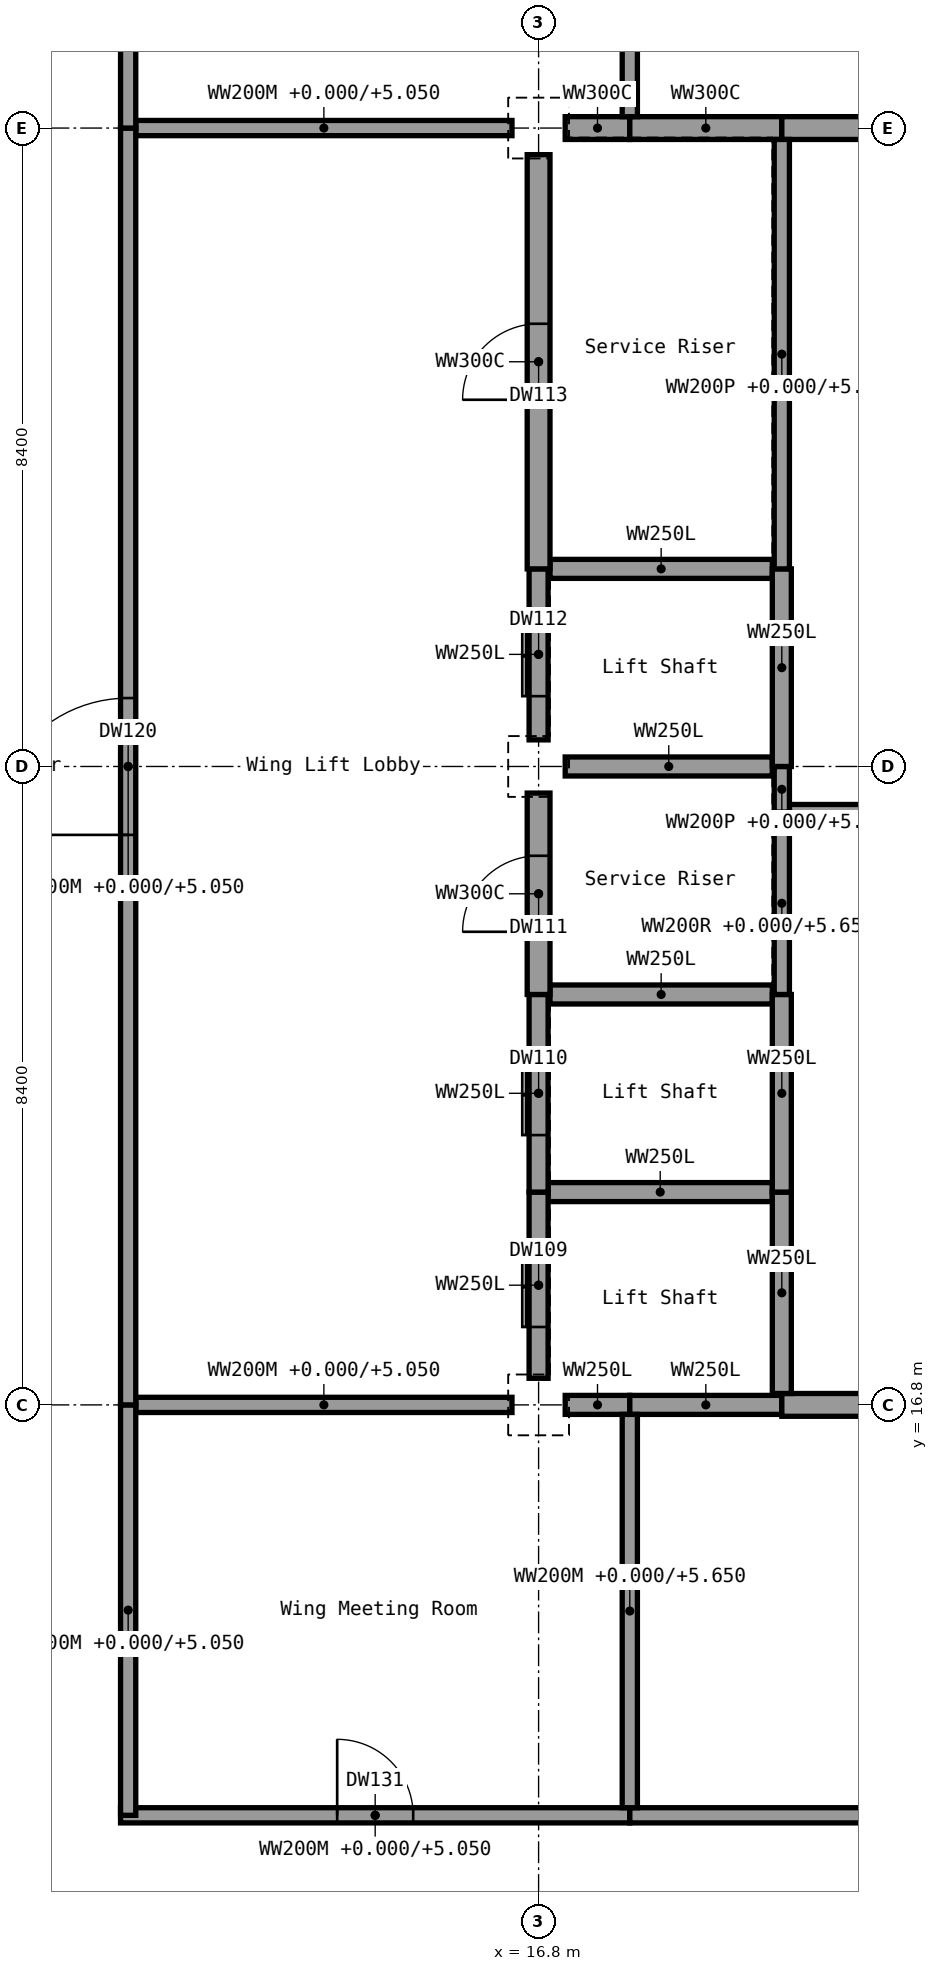
"""IFC4 building model, lengths in metres.
Left out: names, types, materials, properties, quantities, classifications, styles, units other than length and angle.
Written with IfcOpenShell. Run it as: python <this file> out.ifc"""

import sys

from ifc_helpers import new_model, si_unit, direction, frame, frame_2d, origin, origin_2d, place, context, subcontext, project, spatial, rectangle, extrude, element, fill, save


model = new_model("IFC4")
c1 = context("Model", 3, precision=1e-05, world=origin(), true_north=direction((0.0, 1.0)))
c2 = subcontext(c1, "Body", "Model", "MODEL_VIEW")
j1 = project(units=[si_unit("LENGTHUNIT", "METRE"), si_unit("PLANEANGLEUNIT", "RADIAN")], contexts=[c1])
p1 = place(None, origin())
s1 = spatial("IfcSite", under=j1, at=p1, CompositionType="ELEMENT")
p2 = place(p1, origin())
s2 = spatial("IfcBuilding", under=s1, at=p2, CompositionType="ELEMENT")
p3 = place(p2, origin())
s3 = spatial("IfcBuildingStorey", under=s2, at=p3, CompositionType="ELEMENT", Elevation=0.0)
for number, where, z_axis, x_axis in (
    (1, (16.8, 16.8, 0.0), (0.0, 0.0, 1.0), (1.0, 0.0, 0.0)),
    (2, (16.8, 25.2, 0.0), (0.0, 0.0, 1.0), (1.0, 0.0, 0.0)),
    (3, (16.8, 33.6, 0.0), (0.0, 0.0, 1.0), (1.0, 0.0, 0.0)),
):
    element("IfcColumn", number, at=place(p3, frame(where, z_axis=z_axis, x_axis=x_axis)), inside=s3, PredefinedType="COLUMN", context=c2, shape_type="SweptSolid", body=[
        extrude(rectangle(XDim=0.7, YDim=0.7, at=origin_2d()), origin(), (0.0, 0.0, 1.0), 6.0),
    ])
p4 = place(p3, frame((11.3, 11.4, 0.0), z_axis=(0.0, 0.0, 1.0), x_axis=(1.0, 0.0, 0.0)))
e4 = element("IfcWall", 4, at=p4, inside=s3, PredefinedType="PARTITIONING", context=c2, shape_type="SweptSolid", body=[
    extrude(rectangle(XDim=6.7, YDim=0.2, at=frame_2d((3.35, 0.0))), origin(), (0.0, 0.0, 1.0), 5.05),
])
p5 = place(p4, frame((2.85, 0.0, 0.0)))
e5 = element("IfcOpeningElement", 5, at=p5, cuts=e4, PredefinedType="OPENING", context=c2, shape_type="SweptSolid", body=[
    extrude(rectangle(XDim=1.0, YDim=2.1, at=frame_2d((0.5, 1.05))), frame((0.0, 0.1, 0.0), z_axis=(0.0, -1.0, 0.0), x_axis=(1.0, 0.0, 0.0)), (0.0, 0.0, 1.0), 0.2),
])
p6 = place(p3, frame((18.0, 11.4, 0.0), z_axis=(0.0, 0.0, 1.0), x_axis=(1.0, 0.0, 0.0)))
e6 = element("IfcWall", 6, at=p6, inside=s3, PredefinedType="PARTITIONING", context=c2, shape_type="SweptSolid", body=[
    extrude(rectangle(XDim=12.0, YDim=0.2, at=frame_2d((6.0, 0.0))), origin(), (0.0, 0.0, 1.0), 5.05),
])
p7 = place(p6, frame((5.5, 0.0, 0.0)))
e7 = element("IfcOpeningElement", 7, at=p7, cuts=e6, PredefinedType="OPENING", context=c2, shape_type="SweptSolid", body=[
    extrude(rectangle(XDim=1.0, YDim=2.1, at=frame_2d((0.5, 1.05))), frame((0.0, 0.1, 0.0), z_axis=(0.0, -1.0, 0.0), x_axis=(1.0, 0.0, 0.0)), (0.0, 0.0, 1.0), 0.2),
])
p8 = place(p3, frame((11.5, 16.8, 0.0), z_axis=(0.0, 0.0, 1.0), x_axis=(1.0, 0.0, 0.0)))
e8 = element("IfcWall", 8, at=p8, inside=s3, PredefinedType="PARTITIONING", context=c2, shape_type="SweptSolid", body=[
    extrude(rectangle(XDim=4.95, YDim=0.2, at=frame_2d((2.475, 0.0))), origin(), (0.0, 0.0, 1.0), 5.05),
])
p9 = place(p3, frame((17.15, 16.8, 0.0), z_axis=(0.0, 0.0, 1.0), x_axis=(1.0, 0.0, 0.0)))
e9 = element("IfcWall", 9, at=p9, inside=s3, PredefinedType="SHEAR", context=c2, shape_type="SweptSolid", body=[
    extrude(rectangle(XDim=0.85, YDim=0.25, at=frame_2d((0.425, 0.0))), origin(), (0.0, 0.0, 1.0), 5.65),
])
p10 = place(p3, frame((18.0, 16.8, 0.0), z_axis=(0.0, 0.0, 1.0), x_axis=(1.0, 0.0, 0.0)))
e10 = element("IfcWall", 10, at=p10, inside=s3, PredefinedType="SHEAR", context=c2, shape_type="SweptSolid", body=[
    extrude(rectangle(XDim=2.0, YDim=0.25, at=frame_2d((1.0, 0.0))), origin(), (0.0, 0.0, 1.0), 5.65),
])
p11 = place(p3, frame((20.0, 16.8, 0.0), z_axis=(0.0, 0.0, 1.0), x_axis=(1.0, 0.0, 0.0)))
e11 = element("IfcWall", 11, at=p11, inside=s3, PredefinedType="SHEAR", context=c2, shape_type="SweptSolid", body=[
    extrude(rectangle(XDim=4.85, YDim=0.3, at=frame_2d((2.425, 0.0))), origin(), (0.0, 0.0, 1.0), 5.65),
])
p12 = place(p11, frame((1.925, 0.0, 0.0)))
e12 = element("IfcOpeningElement", 12, at=p12, cuts=e11, PredefinedType="OPENING", context=c2, shape_type="SweptSolid", body=[
    extrude(rectangle(XDim=1.0, YDim=2.1, at=frame_2d((0.5, 1.05))), frame((0.0, 0.15, 0.0), z_axis=(0.0, -1.0, 0.0), x_axis=(1.0, 0.0, 0.0)), (0.0, 0.0, 1.0), 0.3),
])
p13 = place(p3, frame((16.925, 19.6, 0.0), z_axis=(0.0, 0.0, 1.0), x_axis=(1.0, 0.0, 0.0)))
e13 = element("IfcWall", 13, at=p13, inside=s3, PredefinedType="SHEAR", context=c2, shape_type="SweptSolid", body=[
    extrude(rectangle(XDim=2.95, YDim=0.25, at=frame_2d((1.475, 0.0))), origin(), (0.0, 0.0, 1.0), 5.65),
])
p14 = place(p3, frame((16.95, 22.2, 0.0), z_axis=(0.0, 0.0, 1.0), x_axis=(1.0, 0.0, 0.0)))
e14 = element("IfcWall", 14, at=p14, inside=s3, PredefinedType="SHEAR", context=c2, shape_type="SweptSolid", body=[
    extrude(rectangle(XDim=2.925, YDim=0.25, at=frame_2d((1.462, 0.0))), origin(), (0.0, 0.0, 1.0), 5.65),
])
p15 = place(p3, frame((20.1, 24.6, 0.0), z_axis=(0.0, 0.0, 1.0), x_axis=(1.0, 0.0, 0.0)))
e15 = element("IfcWall", 15, at=p15, inside=s3, PredefinedType="SOLIDWALL", context=c2, shape_type="SweptSolid", body=[
    extrude(rectangle(XDim=6.7, YDim=0.2, at=frame_2d((3.35, 0.0))), origin(), (0.0, 0.0, 1.0), 5.65),
])
p16 = place(p3, frame((17.15, 25.2, 0.0), z_axis=(0.0, 0.0, 1.0), x_axis=(1.0, 0.0, 0.0)))
e16 = element("IfcWall", 16, at=p16, inside=s3, PredefinedType="SHEAR", context=c2, shape_type="SweptSolid", body=[
    extrude(rectangle(XDim=2.725, YDim=0.25, at=frame_2d((1.363, 0.0))), origin(), (0.0, 0.0, 1.0), 5.65),
])
p17 = place(p3, frame((16.95, 27.8, 0.0), z_axis=(0.0, 0.0, 1.0), x_axis=(1.0, 0.0, 0.0)))
e17 = element("IfcWall", 17, at=p17, inside=s3, PredefinedType="SHEAR", context=c2, shape_type="SweptSolid", body=[
    extrude(rectangle(XDim=2.925, YDim=0.25, at=frame_2d((1.462, 0.0))), origin(), (0.0, 0.0, 1.0), 5.65),
])
p18 = place(p3, frame((11.5, 33.6, 0.0), z_axis=(0.0, 0.0, 1.0), x_axis=(1.0, 0.0, 0.0)))
e18 = element("IfcWall", 18, at=p18, inside=s3, PredefinedType="PARTITIONING", context=c2, shape_type="SweptSolid", body=[
    extrude(rectangle(XDim=4.95, YDim=0.2, at=frame_2d((2.475, 0.0))), origin(), (0.0, 0.0, 1.0), 5.05),
])
p19 = place(p3, frame((17.15, 33.6, 0.0), z_axis=(0.0, 0.0, 1.0), x_axis=(1.0, 0.0, 0.0)))
e19 = element("IfcWall", 19, at=p19, inside=s3, PredefinedType="SHEAR", context=c2, shape_type="SweptSolid", body=[
    extrude(rectangle(XDim=0.85, YDim=0.3, at=frame_2d((0.425, 0.0))), origin(), (0.0, 0.0, 1.0), 5.65),
])
p20 = place(p3, frame((18.0, 33.6, 0.0), z_axis=(0.0, 0.0, 1.0), x_axis=(1.0, 0.0, 0.0)))
e20 = element("IfcWall", 20, at=p20, inside=s3, PredefinedType="SHEAR", context=c2, shape_type="SweptSolid", body=[
    extrude(rectangle(XDim=2.0, YDim=0.3, at=frame_2d((1.0, 0.0))), origin(), (0.0, 0.0, 1.0), 5.65),
])
p21 = place(p3, frame((20.0, 33.6, 0.0), z_axis=(0.0, 0.0, 1.0), x_axis=(1.0, 0.0, 0.0)))
e21 = element("IfcWall", 21, at=p21, inside=s3, PredefinedType="SHEAR", context=c2, shape_type="SweptSolid", body=[
    extrude(rectangle(XDim=4.85, YDim=0.3, at=frame_2d((2.425, 0.0))), origin(), (0.0, 0.0, 1.0), 5.65),
])
p22 = place(p21, frame((1.925, 0.0, 0.0)))
e22 = element("IfcOpeningElement", 22, at=p22, cuts=e21, PredefinedType="OPENING", context=c2, shape_type="SweptSolid", body=[
    extrude(rectangle(XDim=1.0, YDim=2.1, at=frame_2d((0.5, 1.05))), frame((0.0, 0.15, 0.0), z_axis=(0.0, -1.0, 0.0), x_axis=(1.0, 0.0, 0.0)), (0.0, 0.0, 1.0), 0.3),
])
p23 = place(p3, frame((11.4, 11.4, 0.0), z_axis=(0.0, 0.0, 1.0), x_axis=(0.0, 1.0, 0.0)))
e23 = element("IfcWall", 23, at=p23, inside=s3, PredefinedType="PARTITIONING", context=c2, shape_type="SweptSolid", body=[
    extrude(rectangle(XDim=5.4, YDim=0.2, at=frame_2d((2.7, 0.0))), origin(), (0.0, 0.0, 1.0), 5.05),
])
p24 = place(p3, frame((11.4, 16.8, 0.0), z_axis=(0.0, 0.0, 1.0), x_axis=(0.0, 1.0, 0.0)))
e24 = element("IfcWall", 24, at=p24, inside=s3, PredefinedType="PARTITIONING", context=c2, shape_type="SweptSolid", body=[
    extrude(rectangle(XDim=16.8, YDim=0.2, at=frame_2d((8.4, 0.0))), origin(), (0.0, 0.0, 1.0), 5.05),
])
p25 = place(p24, frame((7.5, 0.0, 0.0)))
e25 = element("IfcOpeningElement", 25, at=p25, cuts=e24, PredefinedType="OPENING", context=c2, shape_type="SweptSolid", body=[
    extrude(rectangle(XDim=1.8, YDim=2.1, at=frame_2d((0.9, 1.05))), frame((0.0, 0.1, 0.0), z_axis=(0.0, -1.0, 0.0), x_axis=(1.0, 0.0, 0.0)), (0.0, 0.0, 1.0), 0.2),
])
p26 = place(p3, frame((11.4, 33.6, 0.0), z_axis=(0.0, 0.0, 1.0), x_axis=(0.0, 1.0, 0.0)))
e26 = element("IfcWall", 26, at=p26, inside=s3, PredefinedType="PARTITIONING", context=c2, shape_type="SweptSolid", body=[
    extrude(rectangle(XDim=5.4, YDim=0.2, at=frame_2d((2.7, 0.0))), origin(), (0.0, 0.0, 1.0), 5.05),
])
p27 = place(p3, frame((16.8, 17.15, 0.0), z_axis=(0.0, 0.0, 1.0), x_axis=(0.0, 1.0, 0.0)))
e27 = element("IfcWall", 27, at=p27, inside=s3, PredefinedType="SHEAR", context=c2, shape_type="SweptSolid", body=[
    extrude(rectangle(XDim=2.45, YDim=0.25, at=frame_2d((1.225, 0.0))), origin(), (0.0, 0.0, 1.0), 5.65),
])
p28 = place(p27, frame((0.675, 0.0, 0.0)))
e28 = element("IfcOpeningElement", 28, at=p28, cuts=e27, PredefinedType="OPENING", context=c2, shape_type="SweptSolid", body=[
    extrude(rectangle(XDim=1.1, YDim=2.1, at=frame_2d((0.55, 1.05))), frame((0.0, 0.125, 0.0), z_axis=(0.0, -1.0, 0.0), x_axis=(1.0, 0.0, 0.0)), (0.0, 0.0, 1.0), 0.25),
])
p29 = place(p3, frame((16.8, 19.6, 0.0), z_axis=(0.0, 0.0, 1.0), x_axis=(0.0, 1.0, 0.0)))
e29 = element("IfcWall", 29, at=p29, inside=s3, PredefinedType="SHEAR", context=c2, shape_type="SweptSolid", body=[
    extrude(rectangle(XDim=2.6, YDim=0.25, at=frame_2d((1.3, 0.0))), origin(), (0.0, 0.0, 1.0), 5.65),
])
p30 = place(p29, frame((0.75, 0.0, 0.0)))
e30 = element("IfcOpeningElement", 30, at=p30, cuts=e29, PredefinedType="OPENING", context=c2, shape_type="SweptSolid", body=[
    extrude(rectangle(XDim=1.1, YDim=2.1, at=frame_2d((0.55, 1.05))), frame((0.0, 0.125, 0.0), z_axis=(0.0, -1.0, 0.0), x_axis=(1.0, 0.0, 0.0)), (0.0, 0.0, 1.0), 0.25),
])
p31 = place(p3, frame((16.8, 22.2, 0.0), z_axis=(0.0, 0.0, 1.0), x_axis=(0.0, 1.0, 0.0)))
e31 = element("IfcWall", 31, at=p31, inside=s3, PredefinedType="SHEAR", context=c2, shape_type="SweptSolid", body=[
    extrude(rectangle(XDim=2.65, YDim=0.3, at=frame_2d((1.325, 0.0))), origin(), (0.0, 0.0, 1.0), 5.65),
])
p32 = place(p31, frame((0.825, 0.0, 0.0)))
e32 = element("IfcOpeningElement", 32, at=p32, cuts=e31, PredefinedType="OPENING", context=c2, shape_type="SweptSolid", body=[
    extrude(rectangle(XDim=1.0, YDim=2.1, at=frame_2d((0.5, 1.05))), frame((0.0, 0.15, 0.0), z_axis=(0.0, -1.0, 0.0), x_axis=(1.0, 0.0, 0.0)), (0.0, 0.0, 1.0), 0.3),
])
p33 = place(p3, frame((16.8, 25.55, 0.0), z_axis=(0.0, 0.0, 1.0), x_axis=(0.0, 1.0, 0.0)))
e33 = element("IfcWall", 33, at=p33, inside=s3, PredefinedType="SHEAR", context=c2, shape_type="SweptSolid", body=[
    extrude(rectangle(XDim=2.25, YDim=0.25, at=frame_2d((1.125, 0.0))), origin(), (0.0, 0.0, 1.0), 5.65),
])
p34 = place(p33, frame((0.575, 0.0, 0.0)))
e34 = element("IfcOpeningElement", 34, at=p34, cuts=e33, PredefinedType="OPENING", context=c2, shape_type="SweptSolid", body=[
    extrude(rectangle(XDim=1.1, YDim=2.1, at=frame_2d((0.55, 1.05))), frame((0.0, 0.125, 0.0), z_axis=(0.0, -1.0, 0.0), x_axis=(1.0, 0.0, 0.0)), (0.0, 0.0, 1.0), 0.25),
])
p35 = place(p3, frame((16.8, 27.8, 0.0), z_axis=(0.0, 0.0, 1.0), x_axis=(0.0, 1.0, 0.0)))
e35 = element("IfcWall", 35, at=p35, inside=s3, PredefinedType="SHEAR", context=c2, shape_type="SweptSolid", body=[
    extrude(rectangle(XDim=5.45, YDim=0.3, at=frame_2d((2.725, 0.0))), origin(), (0.0, 0.0, 1.0), 5.65),
])
p36 = place(p35, frame((2.225, 0.0, 0.0)))
e36 = element("IfcOpeningElement", 36, at=p36, cuts=e35, PredefinedType="OPENING", context=c2, shape_type="SweptSolid", body=[
    extrude(rectangle(XDim=1.0, YDim=2.1, at=frame_2d((0.5, 1.05))), frame((0.0, 0.15, 0.0), z_axis=(0.0, -1.0, 0.0), x_axis=(1.0, 0.0, 0.0)), (0.0, 0.0, 1.0), 0.3),
])
p37 = place(p3, frame((18.0, 11.5, 0.0), z_axis=(0.0, 0.0, 1.0), x_axis=(0.0, 1.0, 0.0)))
e37 = element("IfcWall", 37, at=p37, inside=s3, PredefinedType="PARTITIONING", context=c2, shape_type="SweptSolid", body=[
    extrude(rectangle(XDim=5.175, YDim=0.2, at=frame_2d((2.587, 0.0))), origin(), (0.0, 0.0, 1.0), 5.65),
])
p38 = place(p3, frame((18.0, 33.75, 0.0), z_axis=(0.0, 0.0, 1.0), x_axis=(0.0, 1.0, 0.0)))
e38 = element("IfcWall", 38, at=p38, inside=s3, PredefinedType="SOLIDWALL", context=c2, shape_type="SweptSolid", body=[
    extrude(rectangle(XDim=5.15, YDim=0.2, at=frame_2d((2.575, 0.0))), origin(), (0.0, 0.0, 1.0), 5.65),
])
p39 = place(p3, frame((20.0, 16.95, 0.0), z_axis=(0.0, 0.0, 1.0), x_axis=(0.0, 1.0, 0.0)))
e39 = element("IfcWall", 39, at=p39, inside=s3, PredefinedType="SHEAR", context=c2, shape_type="SweptSolid", body=[
    extrude(rectangle(XDim=2.65, YDim=0.25, at=frame_2d((1.325, 0.0))), origin(), (0.0, 0.0, 1.0), 5.65),
])
p40 = place(p3, frame((20.0, 19.6, 0.0), z_axis=(0.0, 0.0, 1.0), x_axis=(0.0, 1.0, 0.0)))
e40 = element("IfcWall", 40, at=p40, inside=s3, PredefinedType="SHEAR", context=c2, shape_type="SweptSolid", body=[
    extrude(rectangle(XDim=2.6, YDim=0.25, at=frame_2d((1.3, 0.0))), origin(), (0.0, 0.0, 1.0), 5.65),
])
p41 = place(p3, frame((20.0, 22.2, 0.0), z_axis=(0.0, 0.0, 1.0), x_axis=(0.0, 1.0, 0.0)))
e41 = element("IfcWall", 41, at=p41, inside=s3, PredefinedType="SOLIDWALL", context=c2, shape_type="SweptSolid", body=[
    extrude(rectangle(XDim=2.4, YDim=0.2, at=frame_2d((1.2, 0.0))), origin(), (0.0, 0.0, 1.0), 5.65),
])
p42 = place(p3, frame((20.0, 24.6, 0.0), z_axis=(0.0, 0.0, 1.0), x_axis=(0.0, 1.0, 0.0)))
e42 = element("IfcWall", 42, at=p42, inside=s3, PredefinedType="SOLIDWALL", context=c2, shape_type="SweptSolid", body=[
    extrude(rectangle(XDim=0.6, YDim=0.2, at=frame_2d((0.3, 0.0))), origin(), (0.0, 0.0, 1.0), 5.65),
])
p43 = place(p3, frame((20.0, 25.2, 0.0), z_axis=(0.0, 0.0, 1.0), x_axis=(0.0, 1.0, 0.0)))
e43 = element("IfcWall", 43, at=p43, inside=s3, PredefinedType="SHEAR", context=c2, shape_type="SweptSolid", body=[
    extrude(rectangle(XDim=2.6, YDim=0.25, at=frame_2d((1.3, 0.0))), origin(), (0.0, 0.0, 1.0), 5.65),
])
p44 = place(p3, frame((20.0, 27.8, 0.0), z_axis=(0.0, 0.0, 1.0), x_axis=(0.0, 1.0, 0.0)))
e44 = element("IfcWall", 44, at=p44, inside=s3, PredefinedType="SOLIDWALL", context=c2, shape_type="SweptSolid", body=[
    extrude(rectangle(XDim=5.65, YDim=0.2, at=frame_2d((2.825, 0.0))), origin(), (0.0, 0.0, 1.0), 5.65),
])
p45 = place(p28, origin())
e45 = element("IfcDoor", 45, at=p45, inside=s3, OperationType="DOUBLE_DOOR_SLIDING", PredefinedType="DOOR", context=c2, shape_type="SweptSolid", body=[
    extrude(rectangle(XDim=1.1, YDim=2.1, at=frame_2d((0.55, 1.05))), frame((0.0, 0.025, 0.0), z_axis=(0.0, -1.0, 0.0), x_axis=(1.0, 0.0, 0.0)), (0.0, 0.0, 1.0), 0.05),
])
fill(e28, e45)
p46 = place(p30, origin())
e46 = element("IfcDoor", 46, at=p46, inside=s3, OperationType="DOUBLE_DOOR_SLIDING", PredefinedType="DOOR", context=c2, shape_type="SweptSolid", body=[
    extrude(rectangle(XDim=1.1, YDim=2.1, at=frame_2d((0.55, 1.05))), frame((0.0, 0.025, 0.0), z_axis=(0.0, -1.0, 0.0), x_axis=(1.0, 0.0, 0.0)), (0.0, 0.0, 1.0), 0.05),
])
fill(e30, e46)
p47 = place(p32, origin())
e47 = element("IfcDoor", 47, at=p47, inside=s3, OperationType="SINGLE_SWING_LEFT", PredefinedType="DOOR", context=c2, shape_type="SweptSolid", body=[
    extrude(rectangle(XDim=1.0, YDim=2.1, at=frame_2d((0.5, 1.05))), frame((0.0, 0.025, 0.0), z_axis=(0.0, -1.0, 0.0), x_axis=(1.0, 0.0, 0.0)), (0.0, 0.0, 1.0), 0.05),
])
fill(e32, e47)
p48 = place(p34, origin())
e48 = element("IfcDoor", 48, at=p48, inside=s3, OperationType="DOUBLE_DOOR_SLIDING", PredefinedType="DOOR", context=c2, shape_type="SweptSolid", body=[
    extrude(rectangle(XDim=1.1, YDim=2.1, at=frame_2d((0.55, 1.05))), frame((0.0, 0.025, 0.0), z_axis=(0.0, -1.0, 0.0), x_axis=(1.0, 0.0, 0.0)), (0.0, 0.0, 1.0), 0.05),
])
fill(e34, e48)
p49 = place(p36, origin())
e49 = element("IfcDoor", 49, at=p49, inside=s3, OperationType="SINGLE_SWING_LEFT", PredefinedType="DOOR", context=c2, shape_type="SweptSolid", body=[
    extrude(rectangle(XDim=1.0, YDim=2.1, at=frame_2d((0.5, 1.05))), frame((0.0, 0.025, 0.0), z_axis=(0.0, -1.0, 0.0), x_axis=(1.0, 0.0, 0.0)), (0.0, 0.0, 1.0), 0.05),
])
fill(e36, e49)
p50 = place(p25, origin())
e50 = element("IfcDoor", 50, at=p50, inside=s3, OperationType="DOUBLE_DOOR_DOUBLE_SWING", PredefinedType="DOOR", context=c2, shape_type="SweptSolid", body=[
    extrude(rectangle(XDim=1.8, YDim=2.1, at=frame_2d((0.9, 1.05))), frame((0.0, 0.025, 0.0), z_axis=(0.0, -1.0, 0.0), x_axis=(1.0, 0.0, 0.0)), (0.0, 0.0, 1.0), 0.05),
])
fill(e25, e50)
p51 = place(p5, origin())
e51 = element("IfcDoor", 51, at=p51, inside=s3, OperationType="SINGLE_SWING_LEFT", PredefinedType="DOOR", context=c2, shape_type="SweptSolid", body=[
    extrude(rectangle(XDim=1.0, YDim=2.1, at=frame_2d((0.5, 1.05))), frame((0.0, 0.025, 0.0), z_axis=(0.0, -1.0, 0.0), x_axis=(1.0, 0.0, 0.0)), (0.0, 0.0, 1.0), 0.05),
])
fill(e5, e51)
save(model, sys.argv[1])
